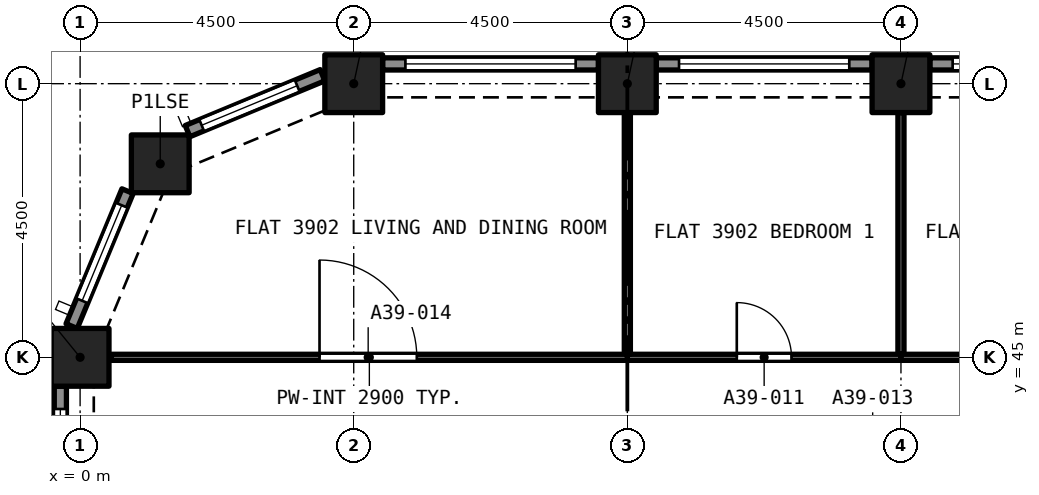
"""IFC4 building model, lengths in metres.
Left out: names, types, materials, properties, quantities, classifications, styles, units other than length and angle.
Written with IfcOpenShell. Run it as: python <this file> out.ifc"""

import sys

from ifc_helpers import new_model, si_unit, direction, frame, frame_2d, origin, origin_2d, place, context, subcontext, project, spatial, rectangle, extrude, element, fill, save


model = new_model("IFC4")
c1 = context("Model", 3, precision=1e-05, world=origin(), true_north=direction((0.0, 1.0)))
c2 = subcontext(c1, "Body", "Model", "MODEL_VIEW")
j1 = project(units=[si_unit("LENGTHUNIT", "METRE"), si_unit("PLANEANGLEUNIT", "RADIAN")], contexts=[c1])
p1 = place(None, origin())
s1 = spatial("IfcSite", under=j1, at=p1, CompositionType="ELEMENT")
p2 = place(p1, origin())
s2 = spatial("IfcBuilding", under=s1, at=p2, CompositionType="ELEMENT")
p3 = place(p2, frame((0.0, 0.0, 139.8)))
s3 = spatial("IfcBuildingStorey", under=s2, at=p3, CompositionType="ELEMENT", Elevation=139.8)
for number, where, z_axis, x_axis in (
    (1, (0.0, 45.0, 0.0), (0.0, 0.0, 1.0), (1.0, 0.0, 0.0)),
    (2, (1.318, 48.182, 0.0), (0.0, 0.0, 1.0), (1.0, 0.0, 0.0)),
    (3, (4.5, 49.5, 0.0), (0.0, 0.0, 1.0), (1.0, 0.0, 0.0)),
    (4, (9.0, 49.5, 0.0), (0.0, 0.0, 1.0), (1.0, 0.0, 0.0)),
    (5, (13.5, 49.5, 0.0), (0.0, 0.0, 1.0), (1.0, 0.0, 0.0)),
):
    element("IfcColumn", number, at=place(p3, frame(where, z_axis=z_axis, x_axis=x_axis)), inside=s3, PredefinedType="COLUMN", context=c2, shape_type="SweptSolid", body=[
        extrude(rectangle(XDim=0.95, YDim=0.95, at=origin_2d()), origin(), (0.0, 0.0, 1.0), 3.2),
    ])
p4 = place(p3, frame((13.975, 49.825, 0.0), z_axis=(0.0, 0.0, 1.0), x_axis=(1.0, 0.0, 0.0)))
e6 = element("IfcWall", 6, at=p4, inside=s3, PredefinedType="SOLIDWALL", context=c2, shape_type="SweptSolid", body=[
    extrude(rectangle(XDim=3.55, YDim=0.2, at=frame_2d((1.775, 0.0))), origin(), (0.0, 0.0, 1.0), 3.2),
])
p5 = place(p4, frame((0.375, 0.0, 0.45)))
e7 = element("IfcOpeningElement", 7, at=p5, cuts=e6, PredefinedType="OPENING", context=c2, shape_type="SweptSolid", body=[
    extrude(rectangle(XDim=2.8, YDim=1.95, at=frame_2d((1.4, 0.975))), frame((0.0, 0.11, 0.0), z_axis=(0.0, -1.0, 0.0), x_axis=(1.0, 0.0, 0.0)), (0.0, 0.0, 1.0), 0.22),
])
p6 = place(p3, frame((9.475, 49.825, 0.0), z_axis=(0.0, 0.0, 1.0), x_axis=(1.0, 0.0, 0.0)))
e8 = element("IfcWall", 8, at=p6, inside=s3, PredefinedType="SOLIDWALL", context=c2, shape_type="SweptSolid", body=[
    extrude(rectangle(XDim=3.55, YDim=0.2, at=frame_2d((1.775, 0.0))), origin(), (0.0, 0.0, 1.0), 3.2),
])
p7 = place(p6, frame((0.375, 0.0, 0.45)))
e9 = element("IfcOpeningElement", 9, at=p7, cuts=e8, PredefinedType="OPENING", context=c2, shape_type="SweptSolid", body=[
    extrude(rectangle(XDim=2.8, YDim=1.95, at=frame_2d((1.4, 0.975))), frame((0.0, 0.11, 0.0), z_axis=(0.0, -1.0, 0.0), x_axis=(1.0, 0.0, 0.0)), (0.0, 0.0, 1.0), 0.22),
])
p8 = place(p3, frame((4.975, 49.825, 0.0), z_axis=(0.0, 0.0, 1.0), x_axis=(1.0, 0.0, 0.0)))
e10 = element("IfcWall", 10, at=p8, inside=s3, PredefinedType="SOLIDWALL", context=c2, shape_type="SweptSolid", body=[
    extrude(rectangle(XDim=3.55, YDim=0.2, at=frame_2d((1.775, 0.0))), origin(), (0.0, 0.0, 1.0), 3.2),
])
p9 = place(p8, frame((0.375, 0.0, 0.45)))
e11 = element("IfcOpeningElement", 11, at=p9, cuts=e10, PredefinedType="OPENING", context=c2, shape_type="SweptSolid", body=[
    extrude(rectangle(XDim=2.8, YDim=1.95, at=frame_2d((1.4, 0.975))), frame((0.0, 0.11, 0.0), z_axis=(0.0, -1.0, 0.0), x_axis=(1.0, 0.0, 0.0)), (0.0, 0.0, 1.0), 0.22),
])
p10 = place(p3, frame((1.767, 48.72, 0.0), z_axis=(0.0, 0.0, 1.0), x_axis=(0.923880599843, 0.382680855588, 0.0)))
e12 = element("IfcWall", 12, at=p10, inside=s3, PredefinedType="SOLIDWALL", context=c2, shape_type="SweptSolid", body=[
    extrude(rectangle(XDim=2.403, YDim=0.2, at=frame_2d((1.201, 0.0))), origin(), (0.0, 0.0, 1.0), 3.2),
])
p11 = place(p10, frame((0.251, 0.0, 0.45)))
e13 = element("IfcOpeningElement", 13, at=p11, cuts=e12, PredefinedType="OPENING", context=c2, shape_type="SweptSolid", body=[
    extrude(rectangle(XDim=1.7, YDim=1.95, at=frame_2d((0.85, 0.975))), frame((0.0, 0.11, 0.0), z_axis=(0.0, -1.0, 0.0), x_axis=(1.0, 0.0, 0.0)), (0.0, 0.0, 1.0), 0.22),
])
p12 = place(p3, frame((-0.139, 45.513, 0.0), z_axis=(0.0, 0.0, 1.0), x_axis=(0.382680855588, 0.923880599843, 0.0)))
e14 = element("IfcWall", 14, at=p12, inside=s3, PredefinedType="SOLIDWALL", context=c2, shape_type="SweptSolid", body=[
    extrude(rectangle(XDim=2.403, YDim=0.2, at=frame_2d((1.201, 0.0))), origin(), (0.0, 0.0, 1.0), 3.2),
])
p13 = place(p12, frame((0.451, 0.0, 0.45)))
e15 = element("IfcOpeningElement", 15, at=p13, cuts=e14, PredefinedType="OPENING", context=c2, shape_type="SweptSolid", body=[
    extrude(rectangle(XDim=1.7, YDim=1.95, at=frame_2d((0.85, 0.975))), frame((0.0, 0.11, 0.0), z_axis=(0.0, -1.0, 0.0), x_axis=(1.0, 0.0, 0.0)), (0.0, 0.0, 1.0), 0.22),
])
p14 = place(p3, frame((-0.325, 40.975, 0.0), z_axis=(0.0, 0.0, 1.0), x_axis=(0.0, 1.0, 0.0)))
e16 = element("IfcWall", 16, at=p14, inside=s3, PredefinedType="SOLIDWALL", context=c2, shape_type="SweptSolid", body=[
    extrude(rectangle(XDim=3.55, YDim=0.2, at=frame_2d((1.775, 0.0))), origin(), (0.0, 0.0, 1.0), 3.2),
])
p15 = place(p14, frame((0.375, 0.0, 0.45)))
e17 = element("IfcOpeningElement", 17, at=p15, cuts=e16, PredefinedType="OPENING", context=c2, shape_type="SweptSolid", body=[
    extrude(rectangle(XDim=2.8, YDim=1.95, at=frame_2d((1.4, 0.975))), frame((0.0, 0.11, 0.0), z_axis=(0.0, -1.0, 0.0), x_axis=(1.0, 0.0, 0.0)), (0.0, 0.0, 1.0), 0.22),
])
p16 = place(p3, frame((13.5, 45.05, 0.0), z_axis=(0.0, 0.0, 1.0), x_axis=(0.0, 1.0, 0.0)))
e18 = element("IfcWall", 18, at=p16, inside=s3, PredefinedType="PARTITIONING", context=c2, shape_type="SweptSolid", body=[
    extrude(rectangle(XDim=3.975, YDim=0.1, at=frame_2d((1.987, 0.0))), origin(), (0.0, 0.0, 1.0), 2.9),
])
p17 = place(p3, frame((9.0, 45.0, 0.0), z_axis=(0.0, 0.0, 1.0), x_axis=(1.0, 0.0, 0.0)))
e19 = element("IfcWall", 19, at=p17, inside=s3, PredefinedType="PARTITIONING", context=c2, shape_type="SweptSolid", body=[
    extrude(rectangle(XDim=4.5, YDim=0.1, at=frame_2d((2.25, 0.0))), origin(), (0.0, 0.0, 1.0), 2.9),
])
p18 = place(p17, frame((1.8, 0.0, 0.0)))
e20 = element("IfcOpeningElement", 20, at=p18, cuts=e19, PredefinedType="OPENING", context=c2, shape_type="SweptSolid", body=[
    extrude(rectangle(XDim=0.9, YDim=2.1, at=frame_2d((0.45, 1.05))), frame((0.0, 0.06, 0.0), z_axis=(0.0, -1.0, 0.0), x_axis=(1.0, 0.0, 0.0)), (0.0, 0.0, 1.0), 0.12),
])
p19 = place(p3, frame((9.0, 45.05, 0.0), z_axis=(0.0, 0.0, 1.0), x_axis=(0.0, 1.0, 0.0)))
e21 = element("IfcWall", 21, at=p19, inside=s3, PredefinedType="PARTITIONING", context=c2, shape_type="SweptSolid", body=[
    extrude(rectangle(XDim=3.975, YDim=0.1, at=frame_2d((1.987, 0.0))), origin(), (0.0, 0.0, 1.0), 2.9),
])
p20 = place(p3, frame((13.5, 45.0, 0.0), z_axis=(0.0, 0.0, 1.0), x_axis=(1.0, 0.0, 0.0)))
e22 = element("IfcWall", 22, at=p20, inside=s3, PredefinedType="PARTITIONING", context=c2, shape_type="SweptSolid", body=[
    extrude(rectangle(XDim=4.025, YDim=0.1, at=frame_2d((2.012, 0.0))), origin(), (0.0, 0.0, 1.0), 2.9),
])
p21 = place(p20, frame((1.8, 0.0, 0.0)))
e23 = element("IfcOpeningElement", 23, at=p21, cuts=e22, PredefinedType="OPENING", context=c2, shape_type="SweptSolid", body=[
    extrude(rectangle(XDim=0.9, YDim=2.1, at=frame_2d((0.45, 1.05))), frame((0.0, 0.06, 0.0), z_axis=(0.0, -1.0, 0.0), x_axis=(1.0, 0.0, 0.0)), (0.0, 0.0, 1.0), 0.12),
])
p22 = place(p3, frame((0.514, 45.0, 0.0), z_axis=(0.0, 0.0, 1.0), x_axis=(1.0, 0.0, 0.0)))
e24 = element("IfcWall", 24, at=p22, inside=s3, PredefinedType="PARTITIONING", context=c2, shape_type="SweptSolid", body=[
    extrude(rectangle(XDim=8.486, YDim=0.1, at=frame_2d((4.243, 0.0))), origin(), (0.0, 0.0, 1.0), 2.9),
])
p23 = place(p22, frame((3.423, 0.0, 0.0)))
e25 = element("IfcOpeningElement", 25, at=p23, cuts=e24, PredefinedType="OPENING", context=c2, shape_type="SweptSolid", body=[
    extrude(rectangle(XDim=1.6, YDim=2.1, at=frame_2d((0.8, 1.05))), frame((0.0, 0.06, 0.0), z_axis=(0.0, -1.0, 0.0), x_axis=(1.0, 0.0, 0.0)), (0.0, 0.0, 1.0), 0.12),
])
p24 = place(p5, origin())
e26 = element("IfcWindow", 26, at=p24, inside=s3, PartitioningType="SINGLE_PANEL", PredefinedType="WINDOW", context=c2, shape_type="SweptSolid", body=[
    extrude(rectangle(XDim=2.8, YDim=1.95, at=frame_2d((1.4, 0.975))), frame((0.0, 0.03, 0.0), z_axis=(0.0, -1.0, 0.0), x_axis=(1.0, 0.0, 0.0)), (0.0, 0.0, 1.0), 0.06),
])
fill(e7, e26)
p25 = place(p7, origin())
e27 = element("IfcWindow", 27, at=p25, inside=s3, PartitioningType="SINGLE_PANEL", PredefinedType="WINDOW", context=c2, shape_type="SweptSolid", body=[
    extrude(rectangle(XDim=2.8, YDim=1.95, at=frame_2d((1.4, 0.975))), frame((0.0, 0.03, 0.0), z_axis=(0.0, -1.0, 0.0), x_axis=(1.0, 0.0, 0.0)), (0.0, 0.0, 1.0), 0.06),
])
fill(e9, e27)
p26 = place(p9, origin())
e28 = element("IfcWindow", 28, at=p26, inside=s3, PartitioningType="SINGLE_PANEL", PredefinedType="WINDOW", context=c2, shape_type="SweptSolid", body=[
    extrude(rectangle(XDim=2.8, YDim=1.95, at=frame_2d((1.4, 0.975))), frame((0.0, 0.03, 0.0), z_axis=(0.0, -1.0, 0.0), x_axis=(1.0, 0.0, 0.0)), (0.0, 0.0, 1.0), 0.06),
])
fill(e11, e28)
p27 = place(p11, origin())
e29 = element("IfcWindow", 29, at=p27, inside=s3, PartitioningType="SINGLE_PANEL", PredefinedType="WINDOW", context=c2, shape_type="SweptSolid", body=[
    extrude(rectangle(XDim=1.7, YDim=1.95, at=frame_2d((0.85, 0.975))), frame((0.0, 0.03, 0.0), z_axis=(0.0, -1.0, 0.0), x_axis=(1.0, 0.0, 0.0)), (0.0, 0.0, 1.0), 0.06),
])
fill(e13, e29)
p28 = place(p13, origin())
e30 = element("IfcWindow", 30, at=p28, inside=s3, PartitioningType="SINGLE_PANEL", PredefinedType="WINDOW", context=c2, shape_type="SweptSolid", body=[
    extrude(rectangle(XDim=1.7, YDim=1.95, at=frame_2d((0.85, 0.975))), frame((0.0, 0.03, 0.0), z_axis=(0.0, -1.0, 0.0), x_axis=(1.0, 0.0, 0.0)), (0.0, 0.0, 1.0), 0.06),
])
fill(e15, e30)
p29 = place(p15, origin())
e31 = element("IfcWindow", 31, at=p29, inside=s3, PartitioningType="SINGLE_PANEL", PredefinedType="WINDOW", context=c2, shape_type="SweptSolid", body=[
    extrude(rectangle(XDim=2.8, YDim=1.95, at=frame_2d((1.4, 0.975))), frame((0.0, 0.03, 0.0), z_axis=(0.0, -1.0, 0.0), x_axis=(1.0, 0.0, 0.0)), (0.0, 0.0, 1.0), 0.06),
])
fill(e17, e31)
p30 = place(p18, origin())
e32 = element("IfcDoor", 32, at=p30, inside=s3, OperationType="SINGLE_SWING_LEFT", PredefinedType="DOOR", context=c2, shape_type="SweptSolid", body=[
    extrude(rectangle(XDim=0.9, YDim=2.1, at=frame_2d((0.45, 1.05))), frame((0.0, 0.025, 0.0), z_axis=(0.0, -1.0, 0.0), x_axis=(1.0, 0.0, 0.0)), (0.0, 0.0, 1.0), 0.05),
])
fill(e20, e32)
p31 = place(p23, origin())
e33 = element("IfcDoor", 33, at=p31, inside=s3, OperationType="SINGLE_SWING_LEFT", PredefinedType="DOOR", context=c2, shape_type="SweptSolid", body=[
    extrude(rectangle(XDim=1.6, YDim=2.1, at=frame_2d((0.8, 1.05))), frame((0.0, 0.025, 0.0), z_axis=(0.0, -1.0, 0.0), x_axis=(1.0, 0.0, 0.0)), (0.0, 0.0, 1.0), 0.05),
])
fill(e25, e33)
save(model, sys.argv[1])
